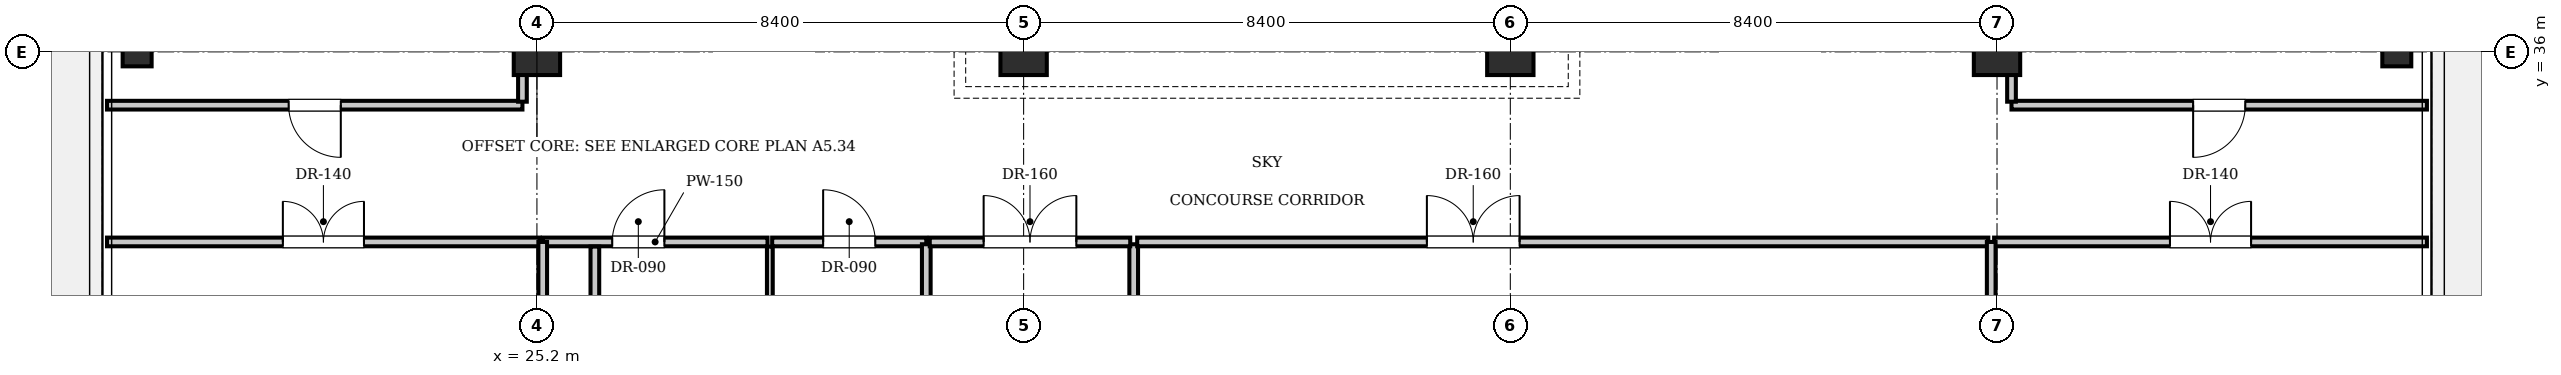
"""IFC4 building model, lengths in metres.
Left out: names, types, materials, properties, quantities, classifications, styles, units other than length and angle.
Written with IfcOpenShell. Run it as: python <this file> out.ifc"""

import sys

from ifc_helpers import new_model, si_unit, direction, frame, frame_2d, origin, origin_2d, place, context, subcontext, project, spatial, rectangle, i_section, extrude, element, fill, save


model = new_model("IFC4")
c1 = context("Model", 3, precision=1e-05, world=origin(), true_north=direction((0.0, 1.0)))
c2 = subcontext(c1, "Body", "Model", "MODEL_VIEW")
j1 = project(units=[si_unit("LENGTHUNIT", "METRE"), si_unit("PLANEANGLEUNIT", "RADIAN")], contexts=[c1])
p1 = place(None, origin())
s1 = spatial("IfcSite", under=j1, at=p1, CompositionType="ELEMENT")
p2 = place(p1, origin())
s2 = spatial("IfcBuilding", under=s1, at=p2, CompositionType="ELEMENT")
p3 = place(p2, frame((0.0, 0.0, 322.0)))
s3 = spatial("IfcBuildingStorey", under=s2, at=p3, CompositionType="ELEMENT", Elevation=322.0)
for number, where, z_axis, x_axis in (
    (1, (25.2, 36.0, 0.0), (0.0, 0.0, 1.0), (1.0, 0.0, 0.0)),
    (2, (33.6, 36.0, 0.0), (0.0, 0.0, 1.0), (1.0, 0.0, 0.0)),
    (3, (42.0, 36.0, 0.0), (0.0, 0.0, 1.0), (1.0, 0.0, 0.0)),
    (4, (50.4, 36.0, 0.0), (0.0, 0.0, 1.0), (1.0, 0.0, 0.0)),
):
    element("IfcColumn", number, at=place(p3, frame(where, z_axis=z_axis, x_axis=x_axis)), inside=s3, PredefinedType="COLUMN", context=c2, shape_type="SweptSolid", body=[
        extrude(rectangle(XDim=0.8, YDim=0.8, at=origin_2d()), origin(), (0.0, 0.0, 1.0), 3.85),
    ])
for number, where, z_axis, x_axis in (
    (5, (18.3, 36.0, -0.24), (0.0, 0.0, 1.0), (1.0, 0.0, 0.0)),
    (6, (57.3, 36.0, -0.24), (0.0, 0.0, 1.0), (1.0, 0.0, 0.0)),
):
    element("IfcColumn", number, at=place(p3, frame(where, z_axis=z_axis, x_axis=x_axis)), inside=s3, PredefinedType="COLUMN", context=c2, shape_type="SweptSolid", body=[
        extrude(i_section(OverallWidth=0.5, OverallDepth=0.5, WebThickness=0.022, FlangeThickness=0.032, at=origin_2d()), origin(), (0.0, 0.0, 1.0), 4.09),
    ])
p4 = place(p3, frame((25.3, 32.72, 0.0), z_axis=(0.0, 0.0, 1.0), x_axis=(1.0, 0.0, 0.0)))
e7 = element("IfcWall", 7, at=p4, inside=s3, PredefinedType="PARTITIONING", context=c2, shape_type="SweptSolid", body=[
    extrude(rectangle(XDim=3.88, YDim=0.15, at=frame_2d((1.94, 0.0))), origin(), (0.0, 0.0, 1.0), 3.61),
])
p5 = place(p4, frame((1.2, 0.0, 0.0)))
e8 = element("IfcOpeningElement", 8, at=p5, cuts=e7, PredefinedType="OPENING", context=c2, shape_type="SweptSolid", body=[
    extrude(rectangle(XDim=0.9, YDim=2.1, at=frame_2d((0.45, 1.05))), frame((0.0, 0.085, 0.0), z_axis=(0.0, -1.0, 0.0), x_axis=(1.0, 0.0, 0.0)), (0.0, 0.0, 1.0), 0.17),
])
p6 = place(p3, frame((29.26, 32.72, 0.0), z_axis=(0.0, 0.0, 1.0), x_axis=(1.0, 0.0, 0.0)))
e9 = element("IfcWall", 9, at=p6, inside=s3, PredefinedType="PARTITIONING", context=c2, shape_type="SweptSolid", body=[
    extrude(rectangle(XDim=2.66, YDim=0.15, at=frame_2d((1.33, 0.0))), origin(), (0.0, 0.0, 1.0), 3.61),
])
p7 = place(p6, frame((0.88, 0.0, 0.0)))
e10 = element("IfcOpeningElement", 10, at=p7, cuts=e9, PredefinedType="OPENING", context=c2, shape_type="SweptSolid", body=[
    extrude(rectangle(XDim=0.9, YDim=2.1, at=frame_2d((0.45, 1.05))), frame((0.0, 0.085, 0.0), z_axis=(0.0, -1.0, 0.0), x_axis=(1.0, 0.0, 0.0)), (0.0, 0.0, 1.0), 0.17),
])
p8 = place(p3, frame((26.2, 29.46, 0.0), z_axis=(0.0, 0.0, 1.0), x_axis=(0.0, 1.0, 0.0)))
e11 = element("IfcWall", 11, at=p8, inside=s3, PredefinedType="PARTITIONING", context=c2, shape_type="SweptSolid", body=[
    extrude(rectangle(XDim=3.18, YDim=0.15, at=frame_2d((1.59, 0.0))), origin(), (0.0, 0.0, 1.0), 3.61),
])
p9 = place(p3, frame((29.22, 29.46, 0.0), z_axis=(0.0, 0.0, 1.0), x_axis=(0.0, 1.0, 0.0)))
e12 = element("IfcWall", 12, at=p9, inside=s3, PredefinedType="PARTITIONING", context=c2, shape_type="SweptSolid", body=[
    extrude(rectangle(XDim=3.18, YDim=0.1, at=frame_2d((1.59, 0.0))), origin(), (0.0, 0.0, 1.0), 3.61),
])
p10 = place(p3, frame((31.92, 29.46, 0.0), z_axis=(0.0, 0.0, 1.0), x_axis=(0.0, 1.0, 0.0)))
e13 = element("IfcWall", 13, at=p10, inside=s3, PredefinedType="PARTITIONING", context=c2, shape_type="SweptSolid", body=[
    extrude(rectangle(XDim=3.22, YDim=0.15, at=frame_2d((1.61, 0.0))), origin(), (0.0, 0.0, 1.0), 3.61),
])
p11 = place(p3, frame((35.5, 25.08, 0.0), z_axis=(0.0, 0.0, 1.0), x_axis=(0.0, 1.0, 0.0)))
e14 = element("IfcWall", 14, at=p11, inside=s3, PredefinedType="PARTITIONING", context=c2, shape_type="SweptSolid", body=[
    extrude(rectangle(XDim=7.6, YDim=0.15, at=frame_2d((3.8, 0.0))), origin(), (0.0, 0.0, 1.0), 3.61),
])
p12 = place(p3, frame((31.98, 32.72, 0.0), z_axis=(0.0, 0.0, 1.0), x_axis=(1.0, 0.0, 0.0)))
e15 = element("IfcWall", 15, at=p12, inside=s3, PredefinedType="PARTITIONING", context=c2, shape_type="SweptSolid", body=[
    extrude(rectangle(XDim=3.46, YDim=0.15, at=frame_2d((1.73, 0.0))), origin(), (0.0, 0.0, 1.0), 3.61),
])
p13 = place(p12, frame((0.93, 0.0, 0.0)))
e16 = element("IfcOpeningElement", 16, at=p13, cuts=e15, PredefinedType="OPENING", context=c2, shape_type="SweptSolid", body=[
    extrude(rectangle(XDim=1.6, YDim=2.3, at=frame_2d((0.8, 1.15))), frame((0.0, 0.085, 0.0), z_axis=(0.0, -1.0, 0.0), x_axis=(1.0, 0.0, 0.0)), (0.0, 0.0, 1.0), 0.17),
])
p14 = place(p3, frame((35.56, 32.72, 0.0), z_axis=(0.0, 0.0, 1.0), x_axis=(1.0, 0.0, 0.0)))
e17 = element("IfcWall", 17, at=p14, inside=s3, PredefinedType="PARTITIONING", context=c2, shape_type="SweptSolid", body=[
    extrude(rectangle(XDim=14.69, YDim=0.15, at=frame_2d((7.345, 0.0))), origin(), (0.0, 0.0, 1.0), 3.61),
])
p15 = place(p14, frame((5.0, 0.0, 0.0)))
e18 = element("IfcOpeningElement", 18, at=p15, cuts=e17, PredefinedType="OPENING", context=c2, shape_type="SweptSolid", body=[
    extrude(rectangle(XDim=1.6, YDim=2.3, at=frame_2d((0.8, 1.15))), frame((0.0, 0.085, 0.0), z_axis=(0.0, -1.0, 0.0), x_axis=(1.0, 0.0, 0.0)), (0.0, 0.0, 1.0), 0.17),
])
p16 = place(p3, frame((17.78, 32.72, 0.0), z_axis=(0.0, 0.0, 1.0), x_axis=(1.0, 0.0, 0.0)))
e19 = element("IfcWall", 19, at=p16, inside=s3, PredefinedType="PARTITIONING", context=c2, shape_type="SweptSolid", body=[
    extrude(rectangle(XDim=7.47, YDim=0.15, at=frame_2d((3.735, 0.0))), origin(), (0.0, 0.0, 1.0), 3.61),
])
p17 = place(p16, frame((3.035, 0.0, 0.0)))
e20 = element("IfcOpeningElement", 20, at=p17, cuts=e19, PredefinedType="OPENING", context=c2, shape_type="SweptSolid", body=[
    extrude(rectangle(XDim=1.4, YDim=2.2, at=frame_2d((0.7, 1.1))), frame((0.0, 0.085, 0.0), z_axis=(0.0, -1.0, 0.0), x_axis=(1.0, 0.0, 0.0)), (0.0, 0.0, 1.0), 0.17),
])
p18 = place(p3, frame((50.35, 32.72, 0.0), z_axis=(0.0, 0.0, 1.0), x_axis=(1.0, 0.0, 0.0)))
e21 = element("IfcWall", 21, at=p18, inside=s3, PredefinedType="PARTITIONING", context=c2, shape_type="SweptSolid", body=[
    extrude(rectangle(XDim=7.47, YDim=0.15, at=frame_2d((3.735, 0.0))), origin(), (0.0, 0.0, 1.0), 3.61),
])
p19 = place(p18, frame((3.035, 0.0, 0.0)))
e22 = element("IfcOpeningElement", 22, at=p19, cuts=e21, PredefinedType="OPENING", context=c2, shape_type="SweptSolid", body=[
    extrude(rectangle(XDim=1.4, YDim=2.2, at=frame_2d((0.7, 1.1))), frame((0.0, 0.085, 0.0), z_axis=(0.0, -1.0, 0.0), x_axis=(1.0, 0.0, 0.0)), (0.0, 0.0, 1.0), 0.17),
])
for number, where, z_axis, x_axis in (
    (23, (25.3, 13.88, 0.0), (0.0, 0.0, 1.0), (0.0, 1.0, 0.0)),
    (24, (50.3, 13.88, 0.0), (0.0, 0.0, 1.0), (0.0, 1.0, 0.0)),
):
    element("IfcWall", number, at=place(p3, frame(where, z_axis=z_axis, x_axis=x_axis)), inside=s3, PredefinedType="PARTITIONING", context=c2, shape_type="SweptSolid", body=[
        extrude(rectangle(XDim=18.84, YDim=0.15, at=frame_2d((9.42, 0.0))), origin(), (0.0, 0.0, 1.0), 3.141),
    ])
p20 = place(p3, frame((17.78, 35.08, 0.0), z_axis=(0.0, 0.0, 1.0), x_axis=(1.0, 0.0, 0.0)))
e25 = element("IfcWall", 25, at=p20, inside=s3, PredefinedType="PARTITIONING", context=c2, shape_type="SweptSolid", body=[
    extrude(rectangle(XDim=7.17, YDim=0.15, at=frame_2d((3.585, 0.0))), origin(), (0.0, 0.0, 1.0), 3.61),
])
p21 = place(p20, frame((3.135, 0.0, 0.0)))
e26 = element("IfcOpeningElement", 26, at=p21, cuts=e25, PredefinedType="OPENING", context=c2, shape_type="SweptSolid", body=[
    extrude(rectangle(XDim=0.9, YDim=2.1, at=frame_2d((0.45, 1.05))), frame((0.0, 0.085, 0.0), z_axis=(0.0, -1.0, 0.0), x_axis=(1.0, 0.0, 0.0)), (0.0, 0.0, 1.0), 0.17),
])
p22 = place(p3, frame((24.95, 35.14, 0.0), z_axis=(0.0, 0.0, 1.0), x_axis=(0.0, 1.0, 0.0)))
e27 = element("IfcWall", 27, at=p22, inside=s3, PredefinedType="PARTITIONING", context=c2, shape_type="SweptSolid", body=[
    extrude(rectangle(XDim=18.78, YDim=0.15, at=frame_2d((9.39, 0.0))), origin(), (0.0, 0.0, 1.0), 3.61),
])
p23 = place(p3, frame((50.65, 35.08, 0.0), z_axis=(0.0, 0.0, 1.0), x_axis=(1.0, 0.0, 0.0)))
e28 = element("IfcWall", 28, at=p23, inside=s3, PredefinedType="PARTITIONING", context=c2, shape_type="SweptSolid", body=[
    extrude(rectangle(XDim=7.17, YDim=0.15, at=frame_2d((3.585, 0.0))), origin(), (0.0, 0.0, 1.0), 3.61),
])
p24 = place(p23, frame((3.135, 0.0, 0.0)))
e29 = element("IfcOpeningElement", 29, at=p24, cuts=e28, PredefinedType="OPENING", context=c2, shape_type="SweptSolid", body=[
    extrude(rectangle(XDim=0.9, YDim=2.1, at=frame_2d((0.45, 1.05))), frame((0.0, 0.085, 0.0), z_axis=(0.0, -1.0, 0.0), x_axis=(1.0, 0.0, 0.0)), (0.0, 0.0, 1.0), 0.17),
])
p25 = place(p3, frame((50.65, 35.14, 0.0), z_axis=(0.0, 0.0, 1.0), x_axis=(0.0, 1.0, 0.0)))
e30 = element("IfcWall", 30, at=p25, inside=s3, PredefinedType="PARTITIONING", context=c2, shape_type="SweptSolid", body=[
    extrude(rectangle(XDim=18.78, YDim=0.15, at=frame_2d((9.39, 0.0))), origin(), (0.0, 0.0, 1.0), 3.61),
])
p26 = place(p5, origin())
e31 = element("IfcDoor", 31, at=p26, inside=s3, OperationType="SINGLE_SWING_RIGHT", PredefinedType="DOOR", context=c2, shape_type="SweptSolid", body=[
    extrude(rectangle(XDim=0.9, YDim=2.1, at=frame_2d((0.45, 1.05))), frame((0.0, 0.025, 0.0), z_axis=(0.0, -1.0, 0.0), x_axis=(1.0, 0.0, 0.0)), (0.0, 0.0, 1.0), 0.05),
])
fill(e8, e31)
p27 = place(p7, origin())
e32 = element("IfcDoor", 32, at=p27, inside=s3, OperationType="SINGLE_SWING_LEFT", PredefinedType="DOOR", context=c2, shape_type="SweptSolid", body=[
    extrude(rectangle(XDim=0.9, YDim=2.1, at=frame_2d((0.45, 1.05))), frame((0.0, 0.025, 0.0), z_axis=(0.0, -1.0, 0.0), x_axis=(1.0, 0.0, 0.0)), (0.0, 0.0, 1.0), 0.05),
])
fill(e10, e32)
p28 = place(p13, origin())
e33 = element("IfcDoor", 33, at=p28, inside=s3, OperationType="DOUBLE_DOOR_SINGLE_SWING", PredefinedType="DOOR", context=c2, shape_type="SweptSolid", body=[
    extrude(rectangle(XDim=1.6, YDim=2.3, at=frame_2d((0.8, 1.15))), frame((0.0, 0.025, 0.0), z_axis=(0.0, -1.0, 0.0), x_axis=(1.0, 0.0, 0.0)), (0.0, 0.0, 1.0), 0.05),
])
fill(e16, e33)
p29 = place(p15, origin())
e34 = element("IfcDoor", 34, at=p29, inside=s3, OperationType="DOUBLE_DOOR_SINGLE_SWING", PredefinedType="DOOR", context=c2, shape_type="SweptSolid", body=[
    extrude(rectangle(XDim=1.6, YDim=2.3, at=frame_2d((0.8, 1.15))), frame((0.0, 0.025, 0.0), z_axis=(0.0, -1.0, 0.0), x_axis=(1.0, 0.0, 0.0)), (0.0, 0.0, 1.0), 0.05),
])
fill(e18, e34)
p30 = place(p17, origin())
e35 = element("IfcDoor", 35, at=p30, inside=s3, OperationType="DOUBLE_DOOR_SINGLE_SWING", PredefinedType="DOOR", context=c2, shape_type="SweptSolid", body=[
    extrude(rectangle(XDim=1.4, YDim=2.2, at=frame_2d((0.7, 1.1))), frame((0.0, 0.025, 0.0), z_axis=(0.0, -1.0, 0.0), x_axis=(1.0, 0.0, 0.0)), (0.0, 0.0, 1.0), 0.05),
])
fill(e20, e35)
p31 = place(p19, origin())
e36 = element("IfcDoor", 36, at=p31, inside=s3, OperationType="DOUBLE_DOOR_SINGLE_SWING", PredefinedType="DOOR", context=c2, shape_type="SweptSolid", body=[
    extrude(rectangle(XDim=1.4, YDim=2.2, at=frame_2d((0.7, 1.1))), frame((0.0, 0.025, 0.0), z_axis=(0.0, -1.0, 0.0), x_axis=(1.0, 0.0, 0.0)), (0.0, 0.0, 1.0), 0.05),
])
fill(e22, e36)
p32 = place(p21, frame((0.9, 0.0, 0.0), z_axis=(0.0, 0.0, 1.0), x_axis=(-1.0, 0.0, 0.0)))
e37 = element("IfcDoor", 37, at=p32, inside=s3, OperationType="SINGLE_SWING_LEFT", PredefinedType="DOOR", context=c2, shape_type="SweptSolid", body=[
    extrude(rectangle(XDim=0.9, YDim=2.1, at=frame_2d((0.45, 1.05))), frame((0.0, 0.025, 0.0), z_axis=(0.0, -1.0, 0.0), x_axis=(1.0, 0.0, 0.0)), (0.0, 0.0, 1.0), 0.05),
])
fill(e26, e37)
p33 = place(p24, frame((0.9, 0.0, 0.0), z_axis=(0.0, 0.0, 1.0), x_axis=(-1.0, 0.0, 0.0)))
e38 = element("IfcDoor", 38, at=p33, inside=s3, OperationType="SINGLE_SWING_RIGHT", PredefinedType="DOOR", context=c2, shape_type="SweptSolid", body=[
    extrude(rectangle(XDim=0.9, YDim=2.1, at=frame_2d((0.45, 1.05))), frame((0.0, 0.025, 0.0), z_axis=(0.0, -1.0, 0.0), x_axis=(1.0, 0.0, 0.0)), (0.0, 0.0, 1.0), 0.05),
])
fill(e29, e38)
save(model, sys.argv[1])
